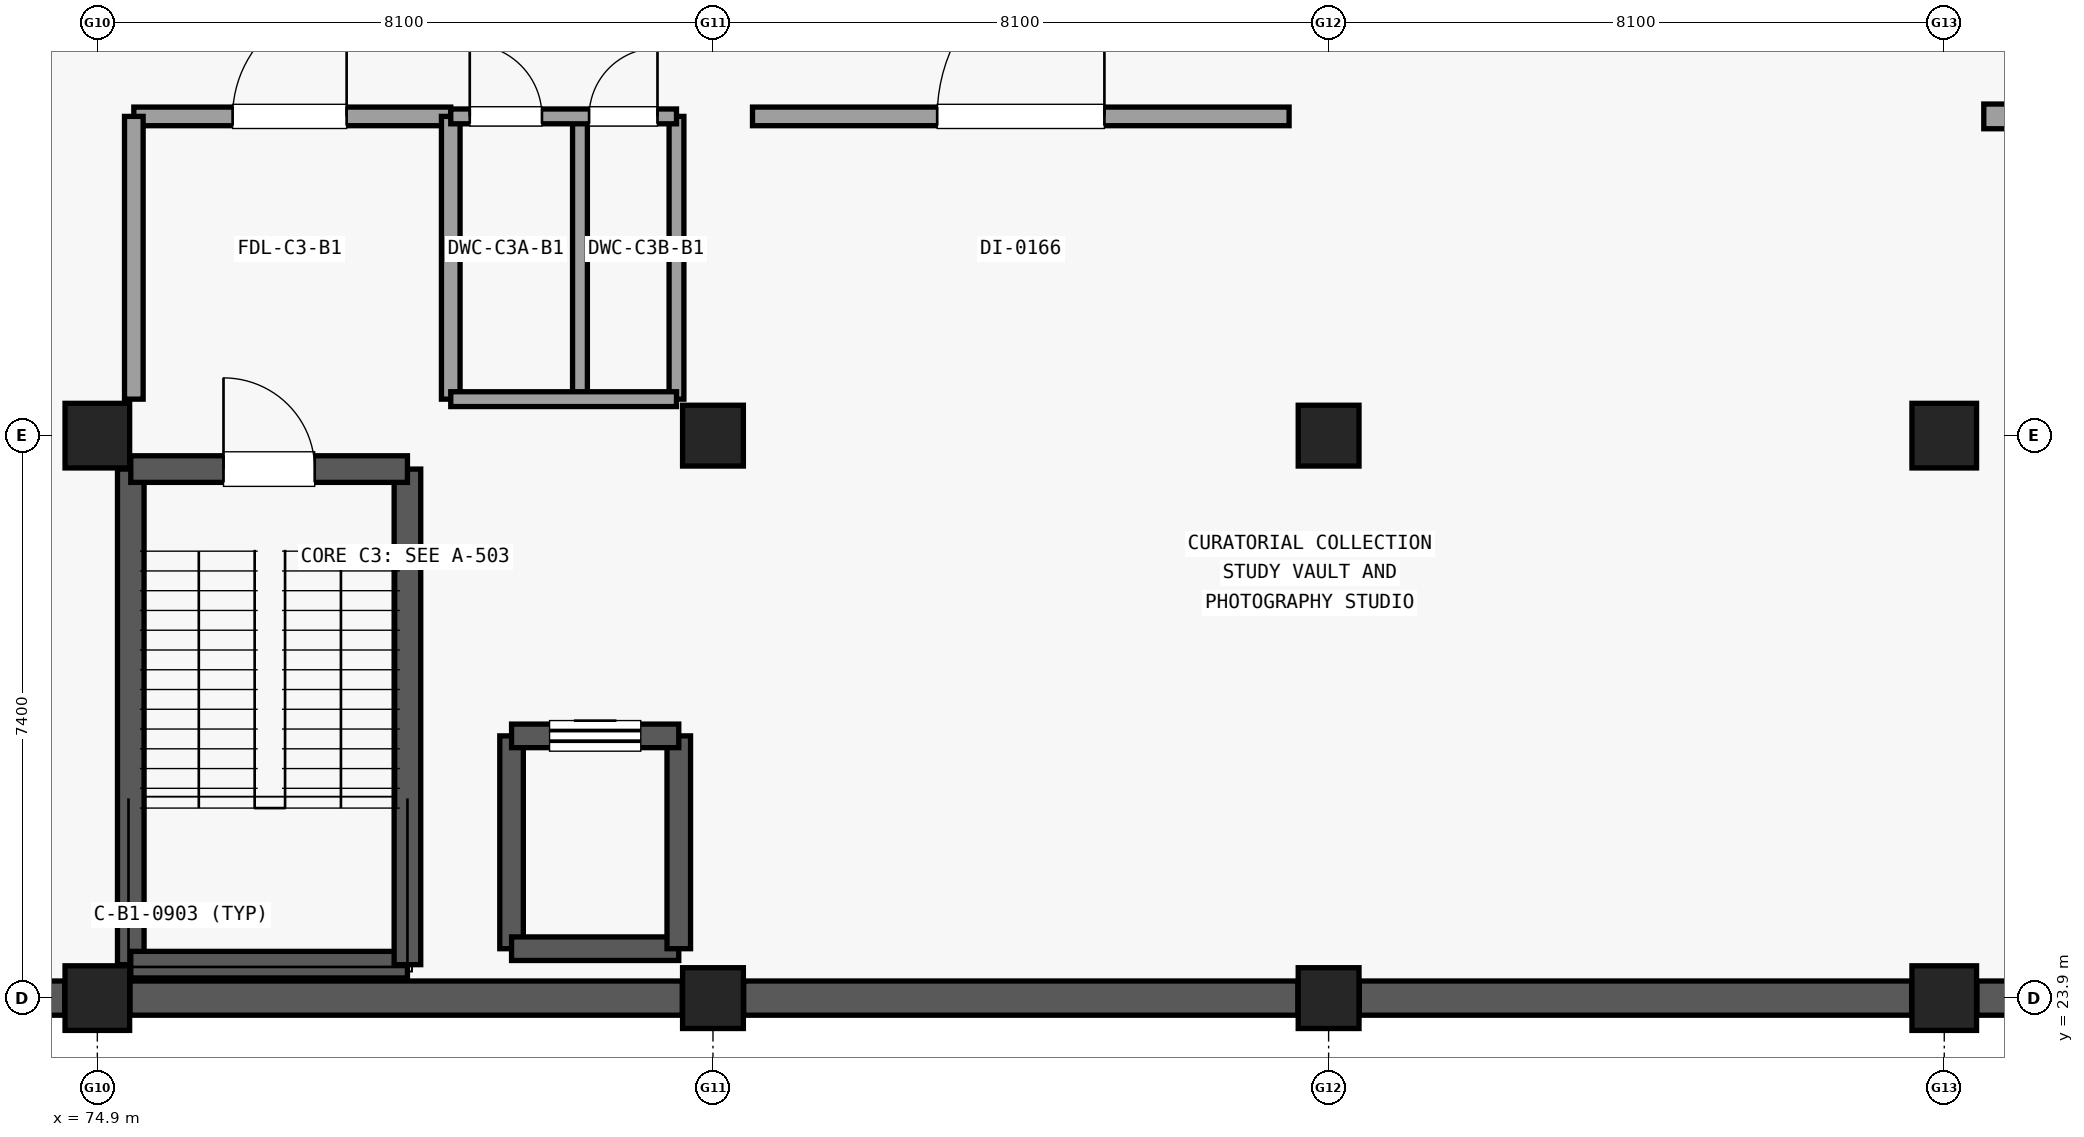
"""IFC4 building model, lengths in metres.
Left out: names, types, materials, properties, quantities, classifications, styles, units other than length and angle.
Written with IfcOpenShell. Run it as: python <this file> out.ifc"""

import sys

from ifc_helpers import new_model, si_unit, direction, frame, frame_2d, origin, origin_2d, place, context, subcontext, project, spatial, rectangle, extrude, element, fill, save


model = new_model("IFC4")
c1 = context("Model", 3, precision=1e-05, world=origin(), true_north=direction((0.0, 1.0)))
c2 = subcontext(c1, "Body", "Model", "MODEL_VIEW")
j1 = project(units=[si_unit("LENGTHUNIT", "METRE"), si_unit("PLANEANGLEUNIT", "RADIAN")], contexts=[c1])
p1 = place(None, origin())
s1 = spatial("IfcSite", under=j1, at=p1, CompositionType="ELEMENT")
p2 = place(p1, origin())
s2 = spatial("IfcBuilding", under=s1, at=p2, CompositionType="ELEMENT")
p3 = place(p2, frame((0.0, 0.0, -4.8)))
s3 = spatial("IfcBuildingStorey", under=s2, at=p3, CompositionType="ELEMENT", Elevation=-4.8)
for number, where, z_axis, x_axis in (
    (1, (74.9, 23.9, 0.0), (0.0, 0.0, 1.0), (1.0, 0.0, 0.0)),
    (2, (74.9, 31.3, 0.0), (0.0, 0.0, 1.0), (1.0, 0.0, 0.0)),
):
    element("IfcColumn", number, at=place(p3, frame(where, z_axis=z_axis, x_axis=x_axis)), inside=s3, PredefinedType="COLUMN", context=c2, shape_type="SweptSolid", body=[
        extrude(rectangle(XDim=0.85, YDim=0.85, at=origin_2d()), origin(), (0.0, 0.0, 1.0), 4.52),
    ])
for number, where, z_axis, x_axis in (
    (3, (83.0, 23.9, 0.0), (0.0, 0.0, 1.0), (1.0, 0.0, 0.0)),
    (4, (83.0, 31.3, 0.0), (0.0, 0.0, 1.0), (1.0, 0.0, 0.0)),
    (5, (91.1, 23.9, 0.0), (0.0, 0.0, 1.0), (1.0, 0.0, 0.0)),
    (6, (91.1, 31.3, 0.0), (0.0, 0.0, 1.0), (1.0, 0.0, 0.0)),
):
    element("IfcColumn", number, at=place(p3, frame(where, z_axis=z_axis, x_axis=x_axis)), inside=s3, PredefinedType="COLUMN", context=c2, shape_type="SweptSolid", body=[
        extrude(rectangle(XDim=0.8, YDim=0.8, at=origin_2d()), origin(), (0.0, 0.0, 1.0), 4.52),
    ])
for number, where, z_axis, x_axis in (
    (7, (99.2, 23.9, 0.0), (0.0, 0.0, 1.0), (1.0, 0.0, 0.0)),
    (8, (99.2, 31.3, 0.0), (0.0, 0.0, 1.0), (1.0, 0.0, 0.0)),
):
    element("IfcColumn", number, at=place(p3, frame(where, z_axis=z_axis, x_axis=x_axis)), inside=s3, PredefinedType="COLUMN", context=c2, shape_type="SweptSolid", body=[
        extrude(rectangle(XDim=0.85, YDim=0.85, at=origin_2d()), origin(), (0.0, 0.0, 1.0), 4.52),
    ])
for number, where, z_axis, x_axis in (
    (9, (74.471, 23.9, 0.0), (0.0, 0.0, 1.0), (-1.0, 0.0, 0.0)),
    (10, (82.596, 23.9, 0.0), (0.0, 0.0, 1.0), (-1.0, 0.0, 0.0)),
):
    element("IfcWall", number, at=place(p3, frame(where, z_axis=z_axis, x_axis=x_axis)), inside=s3, PredefinedType="USERDEFINED", context=c2, shape_type="SweptSolid", body=[
        extrude(rectangle(XDim=7.267, YDim=0.45, at=frame_2d((3.633, 0.0))), origin(), (0.0, 0.0, 1.0), 2.95),
    ])
p4 = place(p3, frame((90.696, 23.9, 0.0), z_axis=(0.0, 0.0, 1.0), x_axis=(-1.0, 0.0, 0.0)))
e11 = element("IfcWall", 11, at=p4, inside=s3, PredefinedType="USERDEFINED", context=c2, shape_type="SweptSolid", body=[
    extrude(rectangle(XDim=7.292, YDim=0.45, at=frame_2d((3.646, 0.0))), origin(), (0.0, 0.0, 1.0), 2.95),
])
for number, where, z_axis, x_axis in (
    (12, (98.771, 23.9, 0.0), (0.0, 0.0, 1.0), (-1.0, 0.0, 0.0)),
    (13, (106.896, 23.9, 0.0), (0.0, 0.0, 1.0), (-1.0, 0.0, 0.0)),
):
    element("IfcWall", number, at=place(p3, frame(where, z_axis=z_axis, x_axis=x_axis)), inside=s3, PredefinedType="USERDEFINED", context=c2, shape_type="SweptSolid", body=[
        extrude(rectangle(XDim=7.267, YDim=0.45, at=frame_2d((3.634, 0.0))), origin(), (0.0, 0.0, 1.0), 2.95),
    ])
p5 = place(p3, frame((75.34, 24.34, 0.0), z_axis=(0.0, 0.0, 1.0), x_axis=(0.0, 1.0, 0.0)))
e14 = element("IfcWall", 14, at=p5, inside=s3, PredefinedType="SHEAR", context=c2, shape_type="SweptSolid", body=[
    extrude(rectangle(XDim=6.52, YDim=0.35, at=frame_2d((3.26, 0.0))), origin(), (0.0, 0.0, 1.0), 4.515),
])
p6 = place(p3, frame((75.34, 24.34, 0.0), z_axis=(0.0, 0.0, 1.0), x_axis=(1.0, 0.0, 0.0)))
e15 = element("IfcWall", 15, at=p6, inside=s3, PredefinedType="SHEAR", context=c2, shape_type="SweptSolid", body=[
    extrude(rectangle(XDim=3.64, YDim=0.35, at=frame_2d((1.82, 0.0))), origin(), (0.0, 0.0, 1.0), 4.515),
])
p7 = place(p3, frame((78.98, 24.34, 0.0), z_axis=(0.0, 0.0, 1.0), x_axis=(0.0, 1.0, 0.0)))
e16 = element("IfcWall", 16, at=p7, inside=s3, PredefinedType="SHEAR", context=c2, shape_type="SweptSolid", body=[
    extrude(rectangle(XDim=6.52, YDim=0.35, at=frame_2d((3.26, 0.0))), origin(), (0.0, 0.0, 1.0), 4.515),
])
p8 = place(p3, frame((75.34, 30.86, 0.0), z_axis=(0.0, 0.0, 1.0), x_axis=(1.0, 0.0, 0.0)))
e17 = element("IfcWall", 17, at=p8, inside=s3, PredefinedType="SHEAR", context=c2, shape_type="SweptSolid", body=[
    extrude(rectangle(XDim=3.64, YDim=0.35, at=frame_2d((1.82, 0.0))), origin(), (0.0, 0.0, 1.0), 4.515),
])
p9 = place(p8, frame((1.22, 0.0, 0.0)))
e18 = element("IfcOpeningElement", 18, at=p9, cuts=e17, PredefinedType="OPENING", context=c2, shape_type="SweptSolid", body=[
    extrude(rectangle(XDim=1.2, YDim=2.15, at=frame_2d((0.6, 1.075))), frame((0.0, 0.185, 0.0), z_axis=(0.0, -1.0, 0.0), x_axis=(1.0, 0.0, 0.0)), (0.0, 0.0, 1.0), 0.37),
])
p10 = place(p3, frame((80.35, 24.55, 0.0), z_axis=(0.0, 0.0, 1.0), x_axis=(0.0, 1.0, 0.0)))
e19 = element("IfcWall", 19, at=p10, inside=s3, PredefinedType="SHEAR", context=c2, shape_type="SweptSolid", body=[
    extrude(rectangle(XDim=2.8, YDim=0.31, at=frame_2d((1.4, 0.0))), origin(), (0.0, 0.0, 1.0), 4.515),
])
p11 = place(p3, frame((80.35, 24.55, 0.0), z_axis=(0.0, 0.0, 1.0), x_axis=(1.0, 0.0, 0.0)))
e20 = element("IfcWall", 20, at=p11, inside=s3, PredefinedType="SHEAR", context=c2, shape_type="SweptSolid", body=[
    extrude(rectangle(XDim=2.2, YDim=0.31, at=frame_2d((1.1, 0.0))), origin(), (0.0, 0.0, 1.0), 4.515),
])
p12 = place(p3, frame((82.55, 24.55, 0.0), z_axis=(0.0, 0.0, 1.0), x_axis=(0.0, 1.0, 0.0)))
e21 = element("IfcWall", 21, at=p12, inside=s3, PredefinedType="SHEAR", context=c2, shape_type="SweptSolid", body=[
    extrude(rectangle(XDim=2.8, YDim=0.31, at=frame_2d((1.4, 0.0))), origin(), (0.0, 0.0, 1.0), 4.515),
])
p13 = place(p3, frame((80.35, 27.35, 0.0), z_axis=(0.0, 0.0, 1.0), x_axis=(1.0, 0.0, 0.0)))
e22 = element("IfcWall", 22, at=p13, inside=s3, PredefinedType="SHEAR", context=c2, shape_type="SweptSolid", body=[
    extrude(rectangle(XDim=2.2, YDim=0.31, at=frame_2d((1.1, 0.0))), origin(), (0.0, 0.0, 1.0), 4.515),
])
p14 = place(p13, frame((0.5, 0.0, 0.0)))
e23 = element("IfcOpeningElement", 23, at=p14, cuts=e22, PredefinedType="OPENING", context=c2, shape_type="SweptSolid", body=[
    extrude(rectangle(XDim=1.2, YDim=2.15, at=frame_2d((0.6, 1.075))), frame((0.0, 0.165, 0.0), z_axis=(0.0, -1.0, 0.0), x_axis=(1.0, 0.0, 0.0)), (0.0, 0.0, 1.0), 0.33),
])
p15 = place(p3, frame((75.38, 35.5, 0.0), z_axis=(0.0, 0.0, 1.0), x_axis=(1.0, 0.0, 0.0)))
e24 = element("IfcWall", 24, at=p15, inside=s3, PredefinedType="PARTITIONING", context=c2, shape_type="SweptSolid", body=[
    extrude(rectangle(XDim=4.17, YDim=0.245, at=frame_2d((2.085, 0.0))), origin(), (0.0, 0.0, 1.0), 3.66),
])
p16 = place(p15, frame((1.3, 0.0, 0.0)))
e25 = element("IfcOpeningElement", 25, at=p16, cuts=e24, PredefinedType="OPENING", context=c2, shape_type="SweptSolid", body=[
    extrude(rectangle(XDim=1.5, YDim=2.15, at=frame_2d((0.75, 1.075))), frame((0.0, 0.133, 0.0), z_axis=(0.0, -1.0, 0.0), x_axis=(1.0, 0.0, 0.0)), (0.0, 0.0, 1.0), 0.265),
])
for number, where, z_axis, x_axis in (
    (26, (75.38, 31.78, 0.0), (0.0, 0.0, 1.0), (0.0, 1.0, 0.0)),
    (27, (79.55, 31.78, 0.0), (0.0, 0.0, 1.0), (0.0, 1.0, 0.0)),
):
    element("IfcWall", number, at=place(p3, frame(where, z_axis=z_axis, x_axis=x_axis)), inside=s3, PredefinedType="PARTITIONING", context=c2, shape_type="SweptSolid", body=[
        extrude(rectangle(XDim=3.72, YDim=0.245, at=frame_2d((1.86, 0.0))), origin(), (0.0, 0.0, 1.0), 3.66),
    ])
for number, where, z_axis, x_axis in (
    (28, (81.25, 31.78, 0.0), (0.0, 0.0, 1.0), (0.0, 1.0, 0.0)),
    (29, (82.52, 31.78, 0.0), (0.0, 0.0, 1.0), (0.0, 1.0, 0.0)),
):
    element("IfcWall", number, at=place(p3, frame(where, z_axis=z_axis, x_axis=x_axis)), inside=s3, PredefinedType="PARTITIONING", context=c2, shape_type="SweptSolid", body=[
        extrude(rectangle(XDim=3.72, YDim=0.195, at=frame_2d((1.86, 0.0))), origin(), (0.0, 0.0, 1.0), 3.66),
    ])
p17 = place(p3, frame((79.55, 31.78, 0.0), z_axis=(0.0, 0.0, 1.0), x_axis=(1.0, 0.0, 0.0)))
e30 = element("IfcWall", 30, at=p17, inside=s3, PredefinedType="PARTITIONING", context=c2, shape_type="SweptSolid", body=[
    extrude(rectangle(XDim=2.97, YDim=0.195, at=frame_2d((1.485, 0.0))), origin(), (0.0, 0.0, 1.0), 3.66),
])
p18 = place(p3, frame((79.55, 35.5, 0.0), z_axis=(0.0, 0.0, 1.0), x_axis=(1.0, 0.0, 0.0)))
e31 = element("IfcWall", 31, at=p18, inside=s3, PredefinedType="PARTITIONING", context=c2, shape_type="SweptSolid", body=[
    extrude(rectangle(XDim=2.97, YDim=0.195, at=frame_2d((1.485, 0.0))), origin(), (0.0, 0.0, 1.0), 4.505),
])
p19 = place(p18, frame((0.25, 0.0, 0.0)))
e32 = element("IfcOpeningElement", 32, at=p19, cuts=e31, PredefinedType="OPENING", context=c2, shape_type="SweptSolid", body=[
    extrude(rectangle(XDim=0.95, YDim=2.1, at=frame_2d((0.475, 1.05))), frame((0.0, 0.107, 0.0), z_axis=(0.0, -1.0, 0.0), x_axis=(1.0, 0.0, 0.0)), (0.0, 0.0, 1.0), 0.215),
])
p20 = place(p18, frame((1.82, 0.0, 0.0)))
e33 = element("IfcOpeningElement", 33, at=p20, cuts=e31, PredefinedType="OPENING", context=c2, shape_type="SweptSolid", body=[
    extrude(rectangle(XDim=0.9, YDim=2.1, at=frame_2d((0.45, 1.05))), frame((0.0, 0.107, 0.0), z_axis=(0.0, -1.0, 0.0), x_axis=(1.0, 0.0, 0.0)), (0.0, 0.0, 1.0), 0.215),
])
p21 = place(p3, frame((83.52, 35.5, 0.0), z_axis=(0.0, 0.0, 1.0), x_axis=(1.0, 0.0, 0.0)))
e34 = element("IfcWall", 34, at=p21, inside=s3, PredefinedType="PARTITIONING", context=c2, shape_type="SweptSolid", body=[
    extrude(rectangle(XDim=7.06, YDim=0.245, at=frame_2d((3.53, 0.0))), origin(), (0.0, 0.0, 1.0), 4.505),
])
p22 = place(p21, frame((2.43, 0.0, 0.0)))
e35 = element("IfcOpeningElement", 35, at=p22, cuts=e34, PredefinedType="OPENING", context=c2, shape_type="SweptSolid", body=[
    extrude(rectangle(XDim=2.2, YDim=2.65, at=frame_2d((1.1, 1.325))), frame((0.0, 0.133, 0.0), z_axis=(0.0, -1.0, 0.0), x_axis=(1.0, 0.0, 0.0)), (0.0, 0.0, 1.0), 0.265),
])
p23 = place(p3, frame((99.72, 35.5, 0.0), z_axis=(0.0, 0.0, 1.0), x_axis=(1.0, 0.0, 0.0)))
e36 = element("IfcWall", 36, at=p23, inside=s3, PredefinedType="SHEAR", context=c2, shape_type="SweptSolid", body=[
    extrude(rectangle(XDim=7.06, YDim=0.325, at=frame_2d((3.53, 0.0))), origin(), (0.0, 0.0, 1.0), 3.71),
])
p24 = place(p23, frame((2.955, 0.0, 0.0)))
e37 = element("IfcOpeningElement", 37, at=p24, cuts=e36, PredefinedType="OPENING", context=c2, shape_type="SweptSolid", body=[
    extrude(rectangle(XDim=1.15, YDim=2.15, at=frame_2d((0.575, 1.075))), frame((0.0, 0.172, 0.0), z_axis=(0.0, -1.0, 0.0), x_axis=(1.0, 0.0, 0.0)), (0.0, 0.0, 1.0), 0.345),
])
p25 = place(p9, origin())
e38 = element("IfcDoor", 38, at=p25, inside=s3, OperationType="SINGLE_SWING_LEFT", PredefinedType="DOOR", context=c2, shape_type="SweptSolid", body=[
    extrude(rectangle(XDim=1.2, YDim=2.15, at=frame_2d((0.6, 1.075))), frame((0.0, 0.025, 0.0), z_axis=(0.0, -1.0, 0.0), x_axis=(1.0, 0.0, 0.0)), (0.0, 0.0, 1.0), 0.05),
])
fill(e18, e38)
p26 = place(p14, origin())
e39 = element("IfcDoor", 39, at=p26, inside=s3, OperationType="SLIDING_TO_LEFT", PredefinedType="DOOR", context=c2, shape_type="SweptSolid", body=[
    extrude(rectangle(XDim=1.2, YDim=2.15, at=frame_2d((0.6, 1.075))), frame((0.0, 0.025, 0.0), z_axis=(0.0, -1.0, 0.0), x_axis=(1.0, 0.0, 0.0)), (0.0, 0.0, 1.0), 0.05),
])
fill(e23, e39)
p27 = place(p16, origin())
e40 = element("IfcDoor", 40, at=p27, inside=s3, OperationType="SINGLE_SWING_RIGHT", PredefinedType="DOOR", context=c2, shape_type="SweptSolid", body=[
    extrude(rectangle(XDim=1.5, YDim=2.15, at=frame_2d((0.75, 1.075))), frame((0.0, 0.025, 0.0), z_axis=(0.0, -1.0, 0.0), x_axis=(1.0, 0.0, 0.0)), (0.0, 0.0, 1.0), 0.05),
])
fill(e25, e40)
p28 = place(p19, origin())
e41 = element("IfcDoor", 41, at=p28, inside=s3, OperationType="SINGLE_SWING_LEFT", PredefinedType="DOOR", context=c2, shape_type="SweptSolid", body=[
    extrude(rectangle(XDim=0.95, YDim=2.1, at=frame_2d((0.475, 1.05))), frame((0.0, 0.025, 0.0), z_axis=(0.0, -1.0, 0.0), x_axis=(1.0, 0.0, 0.0)), (0.0, 0.0, 1.0), 0.05),
])
fill(e32, e41)
p29 = place(p20, origin())
e42 = element("IfcDoor", 42, at=p29, inside=s3, OperationType="SINGLE_SWING_RIGHT", PredefinedType="DOOR", context=c2, shape_type="SweptSolid", body=[
    extrude(rectangle(XDim=0.9, YDim=2.1, at=frame_2d((0.45, 1.05))), frame((0.0, 0.025, 0.0), z_axis=(0.0, -1.0, 0.0), x_axis=(1.0, 0.0, 0.0)), (0.0, 0.0, 1.0), 0.05),
])
fill(e33, e42)
p30 = place(p22, origin())
e43 = element("IfcDoor", 43, at=p30, inside=s3, OperationType="SINGLE_SWING_RIGHT", PredefinedType="DOOR", context=c2, shape_type="SweptSolid", body=[
    extrude(rectangle(XDim=2.2, YDim=2.65, at=frame_2d((1.1, 1.325))), frame((0.0, 0.025, 0.0), z_axis=(0.0, -1.0, 0.0), x_axis=(1.0, 0.0, 0.0)), (0.0, 0.0, 1.0), 0.05),
])
fill(e35, e43)
save(model, sys.argv[1])
